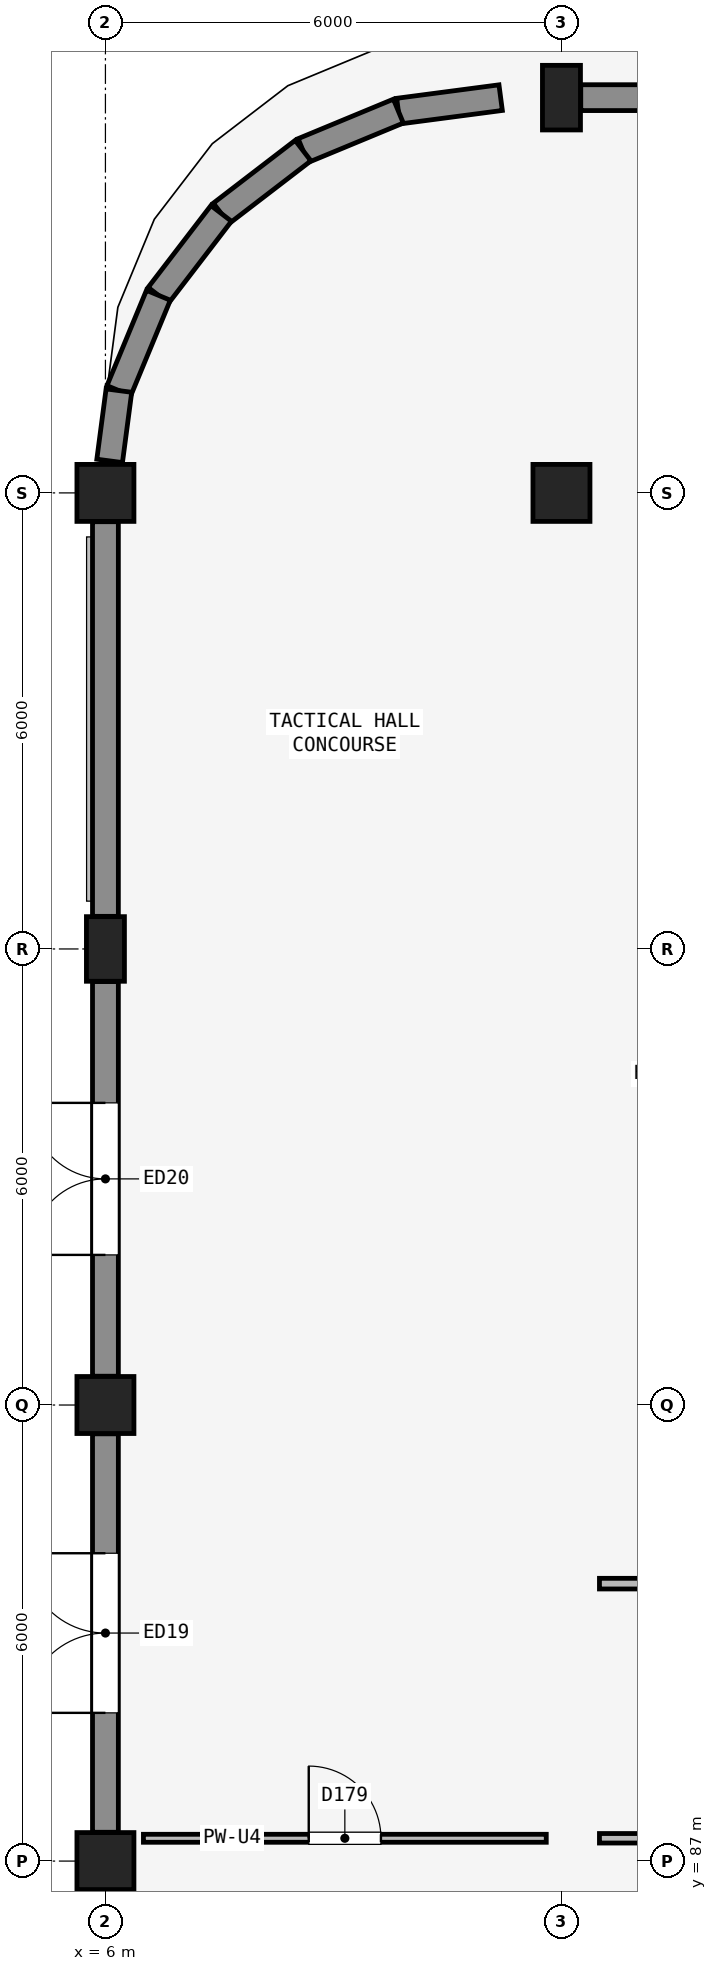
"""IFC4 building model, lengths in metres.
Left out: names, types, materials, properties, quantities, classifications, styles, units other than length and angle.
Written with IfcOpenShell. Run it as: python <this file> out.ifc"""

import sys

from ifc_helpers import new_model, si_unit, direction, frame, frame_2d, origin, origin_2d, place, context, subcontext, project, spatial, rectangle, extrude, element, fill, save


model = new_model("IFC4")
c1 = context("Model", 3, precision=1e-05, world=origin(), true_north=direction((0.0, 1.0)))
c2 = subcontext(c1, "Body", "Model", "MODEL_VIEW")
j1 = project(units=[si_unit("LENGTHUNIT", "METRE"), si_unit("PLANEANGLEUNIT", "RADIAN")], contexts=[c1])
p1 = place(None, origin())
s1 = spatial("IfcSite", under=j1, at=p1, CompositionType="ELEMENT")
p2 = place(p1, origin())
s2 = spatial("IfcBuilding", under=s1, at=p2, CompositionType="ELEMENT")
p3 = place(p2, origin())
s3 = spatial("IfcBuildingStorey", under=s2, at=p3, CompositionType="ELEMENT", Elevation=0.0)
for number, where, z_axis, x_axis in (
    (1, (6.0, 87.0, 0.0), (0.0, 0.0, 1.0), (1.0, 0.0, 0.0)),
    (2, (6.0, 93.0, 0.0), (0.0, 0.0, 1.0), (1.0, 0.0, 0.0)),
):
    element("IfcColumn", number, at=place(p3, frame(where, z_axis=z_axis, x_axis=x_axis)), inside=s3, PredefinedType="COLUMN", context=c2, shape_type="SweptSolid", body=[
        extrude(rectangle(XDim=0.75, YDim=0.75, at=origin_2d()), origin(), (0.0, 0.0, 1.0), 4.8),
    ])
p4 = place(p3, frame((6.0, 99.0, 0.0), z_axis=(0.0, 0.0, 1.0), x_axis=(1.0, 0.0, 0.0)))
e3 = element("IfcColumn", 3, at=p4, inside=s3, PredefinedType="COLUMN", context=c2, shape_type="SweptSolid", body=[
    extrude(rectangle(XDim=0.5, YDim=0.85, at=origin_2d()), origin(), (0.0, 0.0, 1.0), 4.8),
])
for number, where, z_axis, x_axis in (
    (4, (6.0, 105.0, 0.0), (0.0, 0.0, 1.0), (1.0, 0.0, 0.0)),
    (5, (12.0, 105.0, 0.0), (0.0, 0.0, 1.0), (1.0, 0.0, 0.0)),
):
    element("IfcColumn", number, at=place(p3, frame(where, z_axis=z_axis, x_axis=x_axis)), inside=s3, PredefinedType="COLUMN", context=c2, shape_type="SweptSolid", body=[
        extrude(rectangle(XDim=0.75, YDim=0.75, at=origin_2d()), origin(), (0.0, 0.0, 1.0), 4.8),
    ])
p5 = place(p3, frame((12.0, 110.2, 0.0), z_axis=(0.0, 0.0, 1.0), x_axis=(1.0, 0.0, 0.0)))
e6 = element("IfcColumn", 6, at=p5, inside=s3, PredefinedType="COLUMN", context=c2, shape_type="SweptSolid", body=[
    extrude(rectangle(XDim=0.5, YDim=0.85, at=origin_2d()), origin(), (0.0, 0.0, 1.0), 4.8),
])
p6 = place(p3, frame((6.0, 81.429, 0.0), z_axis=(0.0, 0.0, 1.0), x_axis=(0.0, 1.0, 0.0)))
e7 = element("IfcWall", 7, at=p6, inside=s3, PredefinedType="SOLIDWALL", context=c2, shape_type="SweptSolid", body=[
    extrude(rectangle(XDim=5.192, YDim=0.34, at=frame_2d((2.596, 0.0))), origin(), (0.0, 0.0, 1.0), 4.166),
])
p7 = place(p3, frame((6.0, 87.379, 0.0), z_axis=(0.0, 0.0, 1.0), x_axis=(0.0, 1.0, 0.0)))
e8 = element("IfcWall", 8, at=p7, inside=s3, PredefinedType="SOLIDWALL", context=c2, shape_type="SweptSolid", body=[
    extrude(rectangle(XDim=5.242, YDim=0.34, at=frame_2d((2.621, 0.0))), origin(), (0.0, 0.0, 1.0), 3.99),
])
p8 = place(p7, frame((1.571, 0.0, 0.0)))
e9 = element("IfcOpeningElement", 9, at=p8, cuts=e8, PredefinedType="OPENING", context=c2, shape_type="SweptSolid", body=[
    extrude(rectangle(XDim=2.1, YDim=2.4, at=frame_2d((1.05, 1.2))), frame((0.0, 0.18, 0.0), z_axis=(0.0, -1.0, 0.0), x_axis=(1.0, 0.0, 0.0)), (0.0, 0.0, 1.0), 0.36),
])
p9 = place(p3, frame((6.0, 93.379, 0.0), z_axis=(0.0, 0.0, 1.0), x_axis=(0.0, 1.0, 0.0)))
e10 = element("IfcWall", 10, at=p9, inside=s3, PredefinedType="SOLIDWALL", context=c2, shape_type="SweptSolid", body=[
    extrude(rectangle(XDim=5.192, YDim=0.34, at=frame_2d((2.596, 0.0))), origin(), (0.0, 0.0, 1.0), 4.04),
])
p10 = place(p9, frame((1.596, 0.0, 0.0)))
e11 = element("IfcOpeningElement", 11, at=p10, cuts=e10, PredefinedType="OPENING", context=c2, shape_type="SweptSolid", body=[
    extrude(rectangle(XDim=2.0, YDim=2.4, at=frame_2d((1.0, 1.2))), frame((0.0, 0.18, 0.0), z_axis=(0.0, -1.0, 0.0), x_axis=(1.0, 0.0, 0.0)), (0.0, 0.0, 1.0), 0.36),
])
p11 = place(p3, frame((6.0, 99.429, 0.0), z_axis=(0.0, 0.0, 1.0), x_axis=(0.0, 1.0, 0.0)))
e12 = element("IfcWall", 12, at=p11, inside=s3, PredefinedType="SOLIDWALL", context=c2, shape_type="SweptSolid", body=[
    extrude(rectangle(XDim=5.192, YDim=0.34, at=frame_2d((2.596, 0.0))), origin(), (0.0, 0.0, 1.0), 4.09),
])
p12 = place(p3, frame((12.254, 110.2, 0.0), z_axis=(0.0, 0.0, 1.0), x_axis=(1.0, 0.0, 0.0)))
e13 = element("IfcWall", 13, at=p12, inside=s3, PredefinedType="SOLIDWALL", context=c2, shape_type="SweptSolid", body=[
    extrude(rectangle(XDim=5.367, YDim=0.34, at=frame_2d((2.684, 0.0))), origin(), (0.0, 0.0, 1.0), 4.083),
])
p13 = place(p3, frame((11.2, 110.2, 0.0), z_axis=(0.0, 0.0, 1.0), x_axis=(-0.991440211328, -0.130561507967, 0.0)))
e14 = element("IfcWall", 14, at=p13, inside=s3, PredefinedType="SOLIDWALL", context=c2, shape_type="SweptSolid", body=[
    extrude(rectangle(XDim=1.358, YDim=0.34, at=frame_2d((0.679, 0.0))), origin(), (0.0, 0.0, 1.0), 4.495),
])
p14 = place(p3, frame((9.854, 110.023, 0.0), z_axis=(0.0, 0.0, 1.0), x_axis=(-0.923905024937, -0.382621882407, 0.0)))
e15 = element("IfcWall", 15, at=p14, inside=s3, PredefinedType="SOLIDWALL", context=c2, shape_type="SweptSolid", body=[
    extrude(rectangle(XDim=1.357, YDim=0.34, at=frame_2d((0.679, 0.0))), origin(), (0.0, 0.0, 1.0), 4.495),
])
p15 = place(p3, frame((8.6, 109.503, 0.0), z_axis=(0.0, 0.0, 1.0), x_axis=(-0.793392131727, -0.60871087169, 0.0)))
e16 = element("IfcWall", 16, at=p15, inside=s3, PredefinedType="SOLIDWALL", context=c2, shape_type="SweptSolid", body=[
    extrude(rectangle(XDim=1.358, YDim=0.34, at=frame_2d((0.679, 0.0))), origin(), (0.0, 0.0, 1.0), 4.495),
])
for number, where, z_axis, x_axis in (
    (17, (7.523, 108.677, 0.0), (0.0, 0.0, 1.0), (-0.609, -0.793, 0.0)),
    (18, (6.697, 107.6, 0.0), (0.0, 0.0, 1.0), (-0.383, -0.924, 0.0)),
):
    element("IfcWall", number, at=place(p3, frame(where, z_axis=z_axis, x_axis=x_axis)), inside=s3, PredefinedType="SOLIDWALL", context=c2, shape_type="SweptSolid", body=[
        extrude(rectangle(XDim=1.357, YDim=0.34, at=frame_2d((0.679, 0.0))), origin(), (0.0, 0.0, 1.0), 4.495),
    ])
p16 = place(p3, frame((6.177, 106.346, 0.0), z_axis=(0.0, 0.0, 1.0), x_axis=(-0.130603460452, -0.991434685755, 0.0)))
e19 = element("IfcWall", 19, at=p16, inside=s3, PredefinedType="SOLIDWALL", context=c2, shape_type="SweptSolid", body=[
    extrude(rectangle(XDim=0.933, YDim=0.34, at=frame_2d((0.466, 0.0))), origin(), (0.0, 0.0, 1.0), 4.495),
])
p17 = place(p3, frame((12.5, 87.3, 0.0), z_axis=(0.0, 0.0, 1.0), x_axis=(1.0, 0.0, 0.0)))
e20 = element("IfcWall", 20, at=p17, inside=s3, PredefinedType="PARTITIONING", context=c2, shape_type="SweptSolid", body=[
    extrude(rectangle(XDim=35.0, YDim=0.125, at=frame_2d((17.5, 0.0))), origin(), (0.0, 0.0, 1.0), 3.29),
])
p18 = place(p17, frame((16.625, 0.0, 0.0)))
e21 = element("IfcOpeningElement", 21, at=p18, cuts=e20, PredefinedType="OPENING", context=c2, shape_type="SweptSolid", body=[
    extrude(rectangle(XDim=1.75, YDim=2.25, at=frame_2d((0.875, 1.125))), frame((0.0, 0.073, 0.0), z_axis=(0.0, -1.0, 0.0), x_axis=(1.0, 0.0, 0.0)), (0.0, 0.0, 1.0), 0.145),
])
p19 = place(p17, frame((19.025, 0.0, 1.0)))
e22 = element("IfcOpeningElement", 22, at=p19, cuts=e20, PredefinedType="OPENING", context=c2, shape_type="SweptSolid", body=[
    extrude(rectangle(XDim=2.6, YDim=1.2, at=frame_2d((1.3, 0.6))), frame((0.0, 0.073, 0.0), z_axis=(0.0, -1.0, 0.0), x_axis=(1.0, 0.0, 0.0)), (0.0, 0.0, 1.0), 0.145),
])
p20 = place(p3, frame((6.5, 87.3, 0.0), z_axis=(0.0, 0.0, 1.0), x_axis=(1.0, 0.0, 0.0)))
e23 = element("IfcWall", 23, at=p20, inside=s3, PredefinedType="PARTITIONING", context=c2, shape_type="SweptSolid", body=[
    extrude(rectangle(XDim=5.3, YDim=0.105, at=frame_2d((2.65, 0.0))), origin(), (0.0, 0.0, 1.0), 3.29),
])
p21 = place(p20, frame((2.175, 0.0, 0.0)))
e24 = element("IfcOpeningElement", 24, at=p21, cuts=e23, PredefinedType="OPENING", context=c2, shape_type="SweptSolid", body=[
    extrude(rectangle(XDim=0.95, YDim=2.15, at=frame_2d((0.475, 1.075))), frame((0.0, 0.062, 0.0), z_axis=(0.0, -1.0, 0.0), x_axis=(1.0, 0.0, 0.0)), (0.0, 0.0, 1.0), 0.125),
])
p22 = place(p3, frame((43.3, 90.65, 0.0), z_axis=(0.0, 0.0, 1.0), x_axis=(-1.0, 0.0, 0.0)))
e25 = element("IfcWall", 25, at=p22, inside=s3, PredefinedType="PARTITIONING", context=c2, shape_type="SweptSolid", body=[
    extrude(rectangle(XDim=30.8, YDim=0.14, at=frame_2d((15.4, 0.0))), origin(), (0.0, 0.0, 1.0), 3.29),
])
p23 = place(p22, frame((14.45, 0.0, 0.0)))
e26 = element("IfcOpeningElement", 26, at=p23, cuts=e25, PredefinedType="OPENING", context=c2, shape_type="SweptSolid", body=[
    extrude(rectangle(XDim=1.9, YDim=2.3, at=frame_2d((0.95, 1.15))), frame((0.0, 0.08, 0.0), z_axis=(0.0, -1.0, 0.0), x_axis=(1.0, 0.0, 0.0)), (0.0, 0.0, 1.0), 0.16),
])
p24 = place(p22, frame((17.0, 0.0, 1.05)))
e27 = element("IfcOpeningElement", 27, at=p24, cuts=e25, PredefinedType="OPENING", context=c2, shape_type="SweptSolid", body=[
    extrude(rectangle(XDim=1.6, YDim=1.1, at=frame_2d((0.8, 0.55))), frame((0.0, 0.08, 0.0), z_axis=(0.0, -1.0, 0.0), x_axis=(1.0, 0.0, 0.0)), (0.0, 0.0, 1.0), 0.16),
])
p25 = place(p8, origin())
e28 = element("IfcDoor", 28, at=p25, inside=s3, OperationType="DOUBLE_DOOR_SINGLE_SWING", PredefinedType="DOOR", context=c2, shape_type="SweptSolid", body=[
    extrude(rectangle(XDim=2.1, YDim=2.4, at=frame_2d((1.05, 1.2))), frame((0.0, 0.025, 0.0), z_axis=(0.0, -1.0, 0.0), x_axis=(1.0, 0.0, 0.0)), (0.0, 0.0, 1.0), 0.05),
])
fill(e9, e28)
p26 = place(p10, origin())
e29 = element("IfcDoor", 29, at=p26, inside=s3, OperationType="DOUBLE_DOOR_SINGLE_SWING", PredefinedType="DOOR", context=c2, shape_type="SweptSolid", body=[
    extrude(rectangle(XDim=2.0, YDim=2.4, at=frame_2d((1.0, 1.2))), frame((0.0, 0.025, 0.0), z_axis=(0.0, -1.0, 0.0), x_axis=(1.0, 0.0, 0.0)), (0.0, 0.0, 1.0), 0.05),
])
fill(e11, e29)
p27 = place(p21, origin())
e30 = element("IfcDoor", 30, at=p27, inside=s3, OperationType="SINGLE_SWING_LEFT", PredefinedType="DOOR", context=c2, shape_type="SweptSolid", body=[
    extrude(rectangle(XDim=0.95, YDim=2.15, at=frame_2d((0.475, 1.075))), frame((0.0, 0.025, 0.0), z_axis=(0.0, -1.0, 0.0), x_axis=(1.0, 0.0, 0.0)), (0.0, 0.0, 1.0), 0.05),
])
fill(e24, e30)
save(model, sys.argv[1])
